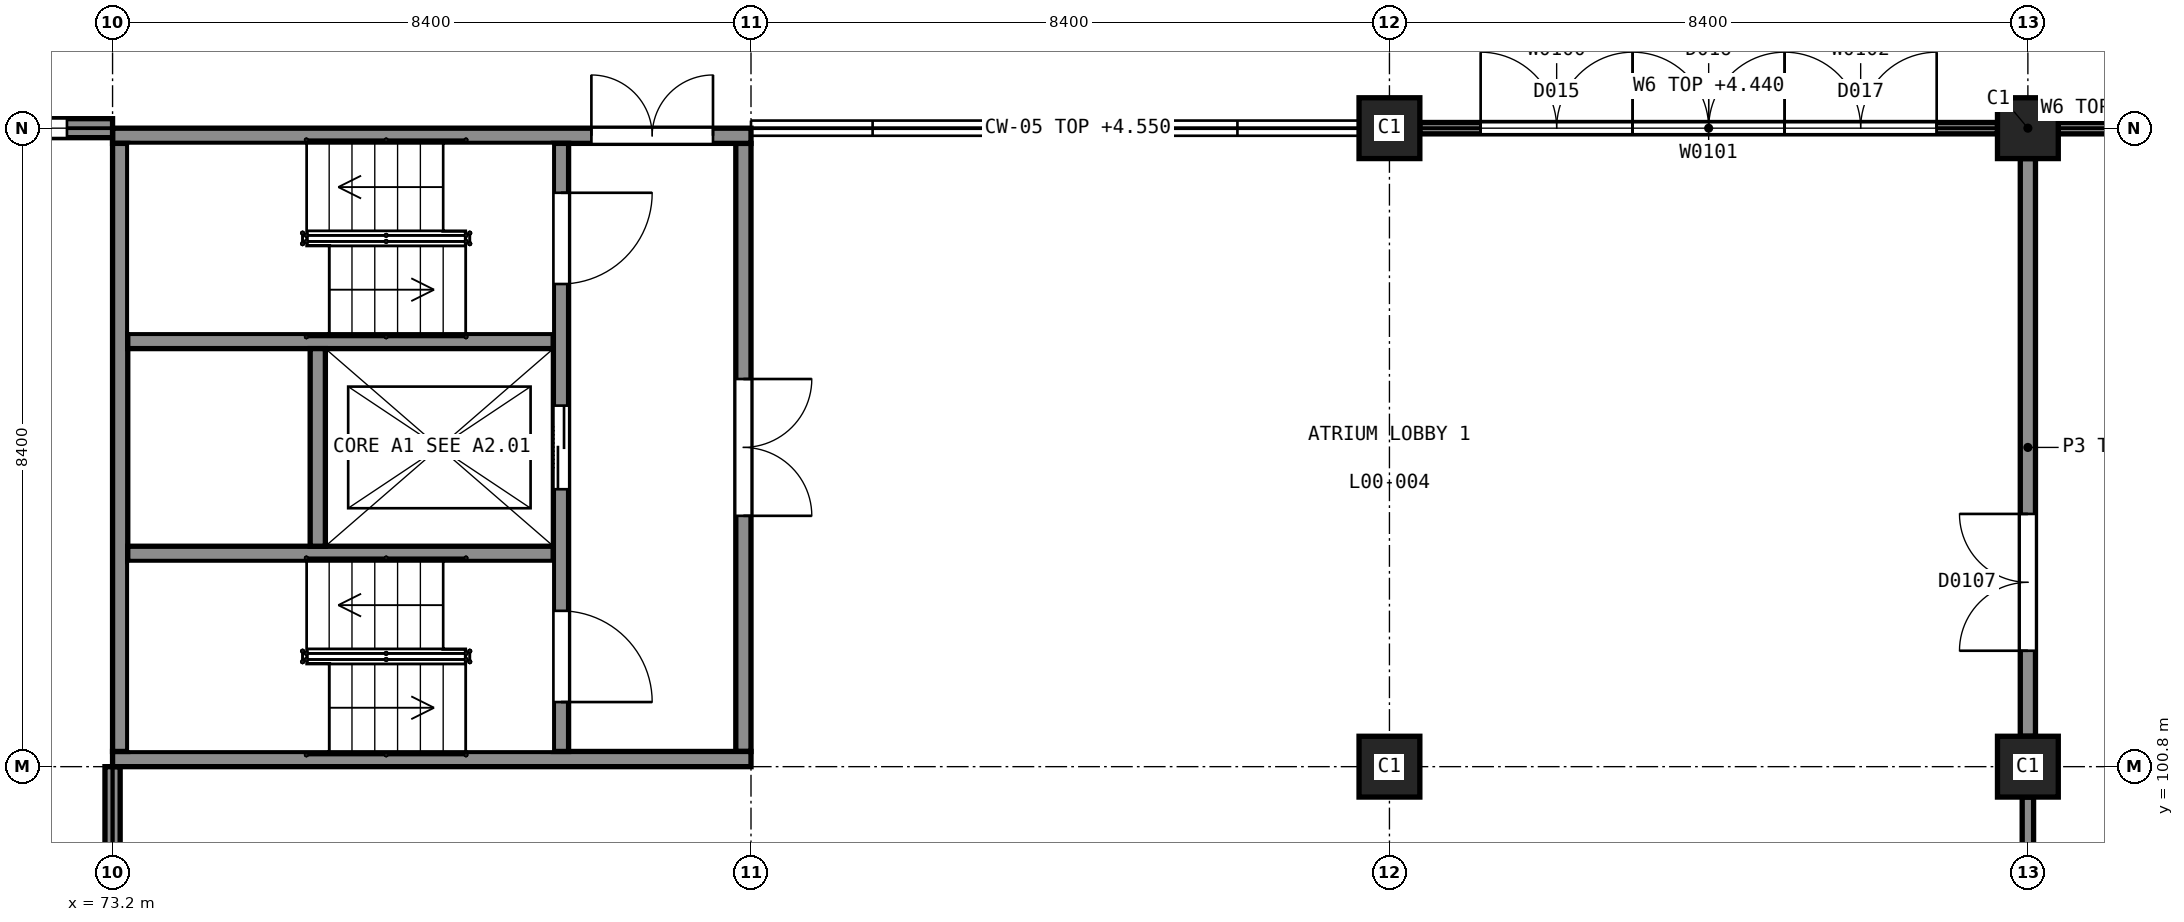
"""IFC4 building model, lengths in metres.
Left out: names, types, materials, properties, quantities, classifications, styles, units other than length and angle.
Written with IfcOpenShell. Run it as: python <this file> out.ifc"""

import sys

from ifc_helpers import new_model, si_unit, direction, frame, frame_2d, origin, origin_2d, place, context, subcontext, project, spatial, rectangle, extrude, element, fill, save


model = new_model("IFC4")
c1 = context("Model", 3, precision=1e-05, world=origin(), true_north=direction((0.0, 1.0)))
c2 = subcontext(c1, "Body", "Model", "MODEL_VIEW")
j1 = project(units=[si_unit("LENGTHUNIT", "METRE"), si_unit("PLANEANGLEUNIT", "RADIAN")], contexts=[c1])
p1 = place(None, origin())
s1 = spatial("IfcSite", under=j1, at=p1, CompositionType="ELEMENT")
p2 = place(p1, origin())
s2 = spatial("IfcBuilding", under=s1, at=p2, CompositionType="ELEMENT")
p3 = place(p2, origin())
s3 = spatial("IfcBuildingStorey", under=s2, at=p3, CompositionType="ELEMENT", Elevation=0.0)
p4 = place(p3, frame((73.2, 100.9, -1.8), z_axis=(0.0, 0.0, 1.0), x_axis=(1.0, 0.0, 0.0)))
e1 = element("IfcWall", 1, at=p4, inside=s3, PredefinedType="SHEAR", context=c2, shape_type="SweptSolid", body=[
    extrude(rectangle(XDim=8.4, YDim=0.2, at=frame_2d((4.2, 0.0))), origin(), (0.0, 0.0, 1.0), 7.3),
])
p5 = place(p3, frame((73.2, 109.1, -1.8), z_axis=(0.0, 0.0, 1.0), x_axis=(1.0, 0.0, 0.0)))
e2 = element("IfcWall", 2, at=p5, inside=s3, PredefinedType="SHEAR", context=c2, shape_type="SweptSolid", body=[
    extrude(rectangle(XDim=8.4, YDim=0.2, at=frame_2d((4.2, 0.0))), origin(), (0.0, 0.0, 1.0), 7.3),
])
p6 = place(p5, frame((6.3, 0.0, 1.8)))
e3 = element("IfcOpeningElement", 3, at=p6, cuts=e2, PredefinedType="OPENING", context=c2, shape_type="SweptSolid", body=[
    extrude(rectangle(XDim=1.6, YDim=2.1, at=frame_2d((0.8, 1.05))), frame((0.0, 0.11, 0.0), z_axis=(0.0, -1.0, 0.0), x_axis=(1.0, 0.0, 0.0)), (0.0, 0.0, 1.0), 0.22),
])
p7 = place(p3, frame((73.3, 101.0, -1.8), z_axis=(0.0, 0.0, 1.0), x_axis=(0.0, 1.0, 0.0)))
e4 = element("IfcWall", 4, at=p7, inside=s3, PredefinedType="SHEAR", context=c2, shape_type="SweptSolid", body=[
    extrude(rectangle(XDim=8.0, YDim=0.2, at=frame_2d((4.0, 0.0))), origin(), (0.0, 0.0, 1.0), 7.3),
])
p8 = place(p3, frame((81.5, 101.0, -1.8), z_axis=(0.0, 0.0, 1.0), x_axis=(0.0, 1.0, 0.0)))
e5 = element("IfcWall", 5, at=p8, inside=s3, PredefinedType="SHEAR", context=c2, shape_type="SweptSolid", body=[
    extrude(rectangle(XDim=8.0, YDim=0.2, at=frame_2d((4.0, 0.0))), origin(), (0.0, 0.0, 1.0), 7.3),
])
p9 = place(p8, frame((3.1, 0.0, 1.8)))
e6 = element("IfcOpeningElement", 6, at=p9, cuts=e5, PredefinedType="OPENING", context=c2, shape_type="SweptSolid", body=[
    extrude(rectangle(XDim=1.8, YDim=2.1, at=frame_2d((0.9, 1.05))), frame((0.0, 0.11, 0.0), z_axis=(0.0, -1.0, 0.0), x_axis=(1.0, 0.0, 0.0)), (0.0, 0.0, 1.0), 0.22),
])
p10 = place(p3, frame((79.1, 101.0, -1.8), z_axis=(0.0, 0.0, 1.0), x_axis=(0.0, 1.0, 0.0)))
e7 = element("IfcWall", 7, at=p10, inside=s3, PredefinedType="SHEAR", context=c2, shape_type="SweptSolid", body=[
    extrude(rectangle(XDim=8.0, YDim=0.2, at=frame_2d((4.0, 0.0))), origin(), (0.0, 0.0, 1.0), 7.3),
])
p11 = place(p10, frame((0.65, 0.0, 1.8)))
e8 = element("IfcOpeningElement", 8, at=p11, cuts=e7, PredefinedType="OPENING", context=c2, shape_type="SweptSolid", body=[
    extrude(rectangle(XDim=1.2, YDim=2.1, at=frame_2d((0.6, 1.05))), frame((0.0, 0.11, 0.0), z_axis=(0.0, -1.0, 0.0), x_axis=(1.0, 0.0, 0.0)), (0.0, 0.0, 1.0), 0.22),
])
p12 = place(p10, frame((6.15, 0.0, 1.8)))
e9 = element("IfcOpeningElement", 9, at=p12, cuts=e7, PredefinedType="OPENING", context=c2, shape_type="SweptSolid", body=[
    extrude(rectangle(XDim=1.2, YDim=2.1, at=frame_2d((0.6, 1.05))), frame((0.0, 0.11, 0.0), z_axis=(0.0, -1.0, 0.0), x_axis=(1.0, 0.0, 0.0)), (0.0, 0.0, 1.0), 0.22),
])
p13 = place(p10, frame((3.45, 0.0, 1.8)))
e10 = element("IfcOpeningElement", 10, at=p13, cuts=e7, PredefinedType="OPENING", context=c2, shape_type="SweptSolid", body=[
    extrude(rectangle(XDim=1.1, YDim=2.1, at=frame_2d((0.55, 1.05))), frame((0.0, 0.11, 0.0), z_axis=(0.0, -1.0, 0.0), x_axis=(1.0, 0.0, 0.0)), (0.0, 0.0, 1.0), 0.22),
])
for number, where, z_axis, x_axis in (
    (11, (73.4, 103.6, -1.8), (0.0, 0.0, 1.0), (1.0, 0.0, 0.0)),
    (12, (73.4, 106.4, -1.8), (0.0, 0.0, 1.0), (1.0, 0.0, 0.0)),
):
    element("IfcWall", number, at=place(p3, frame(where, z_axis=z_axis, x_axis=x_axis)), inside=s3, PredefinedType="SHEAR", context=c2, shape_type="SweptSolid", body=[
        extrude(rectangle(XDim=5.6, YDim=0.2, at=frame_2d((2.8, 0.0))), origin(), (0.0, 0.0, 1.0), 7.3),
    ])
p14 = place(p3, frame((75.9, 103.7, -1.8), z_axis=(0.0, 0.0, 1.0), x_axis=(0.0, 1.0, 0.0)))
e13 = element("IfcWall", 13, at=p14, inside=s3, PredefinedType="SHEAR", context=c2, shape_type="SweptSolid", body=[
    extrude(rectangle(XDim=2.6, YDim=0.2, at=frame_2d((1.3, 0.0))), origin(), (0.0, 0.0, 1.0), 7.3),
])
for number, where, z_axis, x_axis in (
    (14, (90.0, 100.8, -0.3), (0.0, 0.0, 1.0), (1.0, 0.0, 0.0)),
    (15, (90.0, 109.2, -0.3), (0.0, 0.0, 1.0), (1.0, 0.0, 0.0)),
    (16, (98.4, 100.8, -0.3), (0.0, 0.0, 1.0), (1.0, 0.0, 0.0)),
    (17, (98.4, 109.2, -0.3), (0.0, 0.0, 1.0), (1.0, 0.0, 0.0)),
):
    element("IfcColumn", number, at=place(p3, frame(where, z_axis=z_axis, x_axis=x_axis)), inside=s3, PredefinedType="COLUMN", context=c2, shape_type="SweptSolid", body=[
        extrude(rectangle(XDim=0.8, YDim=0.8, at=origin_2d()), origin(), (0.0, 0.0, 1.0), 5.8),
    ])
p15 = place(p3, frame((98.8, 109.2, 0.0), z_axis=(0.0, 0.0, 1.0), x_axis=(1.0, 0.0, 0.0)))
e18 = element("IfcWall", 18, at=p15, inside=s3, PredefinedType="ELEMENTEDWALL", context=c2, shape_type="SweptSolid", body=[
    extrude(rectangle(XDim=7.6, YDim=0.15, at=frame_2d((3.8, 0.0))), origin(), (0.0, 0.0, 1.0), 4.44),
])
p16 = place(p15, frame((2.0, 0.0, 0.0)))
e19 = element("IfcOpeningElement", 19, at=p16, cuts=e18, PredefinedType="OPENING", context=c2, shape_type="SweptSolid", body=[
    extrude(rectangle(XDim=1.8, YDim=2.4, at=frame_2d((0.9, 1.2))), frame((0.0, 0.085, 0.0), z_axis=(0.0, -1.0, 0.0), x_axis=(1.0, 0.0, 0.0)), (0.0, 0.0, 1.0), 0.17),
])
p17 = place(p15, frame((2.0, 0.0, 2.6)))
e20 = element("IfcOpeningElement", 20, at=p17, cuts=e18, PredefinedType="OPENING", context=c2, shape_type="SweptSolid", body=[
    extrude(rectangle(XDim=1.8, YDim=1.74, at=frame_2d((0.9, 0.87))), frame((0.0, 0.085, 0.0), z_axis=(0.0, -1.0, 0.0), x_axis=(1.0, 0.0, 0.0)), (0.0, 0.0, 1.0), 0.17),
])
p18 = place(p15, frame((3.8, 0.0, 0.0)))
e21 = element("IfcOpeningElement", 21, at=p18, cuts=e18, PredefinedType="OPENING", context=c2, shape_type="SweptSolid", body=[
    extrude(rectangle(XDim=1.8, YDim=2.4, at=frame_2d((0.9, 1.2))), frame((0.0, 0.085, 0.0), z_axis=(0.0, -1.0, 0.0), x_axis=(1.0, 0.0, 0.0)), (0.0, 0.0, 1.0), 0.17),
])
p19 = place(p15, frame((3.8, 0.0, 2.6)))
e22 = element("IfcOpeningElement", 22, at=p19, cuts=e18, PredefinedType="OPENING", context=c2, shape_type="SweptSolid", body=[
    extrude(rectangle(XDim=1.8, YDim=1.74, at=frame_2d((0.9, 0.87))), frame((0.0, 0.085, 0.0), z_axis=(0.0, -1.0, 0.0), x_axis=(1.0, 0.0, 0.0)), (0.0, 0.0, 1.0), 0.17),
])
p20 = place(p3, frame((90.4, 109.2, 0.0), z_axis=(0.0, 0.0, 1.0), x_axis=(1.0, 0.0, 0.0)))
e23 = element("IfcWall", 23, at=p20, inside=s3, PredefinedType="ELEMENTEDWALL", context=c2, shape_type="SweptSolid", body=[
    extrude(rectangle(XDim=7.6, YDim=0.15, at=frame_2d((3.8, 0.0))), origin(), (0.0, 0.0, 1.0), 4.44),
])
p21 = place(p20, frame((0.8, 0.0, 0.0)))
e24 = element("IfcOpeningElement", 24, at=p21, cuts=e23, PredefinedType="OPENING", context=c2, shape_type="SweptSolid", body=[
    extrude(rectangle(XDim=2.0, YDim=2.4, at=frame_2d((1.0, 1.2))), frame((0.0, 0.085, 0.0), z_axis=(0.0, -1.0, 0.0), x_axis=(1.0, 0.0, 0.0)), (0.0, 0.0, 1.0), 0.17),
])
p22 = place(p20, frame((0.8, 0.0, 2.6)))
e25 = element("IfcOpeningElement", 25, at=p22, cuts=e23, PredefinedType="OPENING", context=c2, shape_type="SweptSolid", body=[
    extrude(rectangle(XDim=2.0, YDim=1.74, at=frame_2d((1.0, 0.87))), frame((0.0, 0.085, 0.0), z_axis=(0.0, -1.0, 0.0), x_axis=(1.0, 0.0, 0.0)), (0.0, 0.0, 1.0), 0.17),
])
p23 = place(p20, frame((2.8, 0.0, 0.0)))
e26 = element("IfcOpeningElement", 26, at=p23, cuts=e23, PredefinedType="OPENING", context=c2, shape_type="SweptSolid", body=[
    extrude(rectangle(XDim=2.0, YDim=2.4, at=frame_2d((1.0, 1.2))), frame((0.0, 0.085, 0.0), z_axis=(0.0, -1.0, 0.0), x_axis=(1.0, 0.0, 0.0)), (0.0, 0.0, 1.0), 0.17),
])
p24 = place(p20, frame((2.8, 0.0, 2.6)))
e27 = element("IfcOpeningElement", 27, at=p24, cuts=e23, PredefinedType="OPENING", context=c2, shape_type="SweptSolid", body=[
    extrude(rectangle(XDim=2.0, YDim=1.74, at=frame_2d((1.0, 0.87))), frame((0.0, 0.085, 0.0), z_axis=(0.0, -1.0, 0.0), x_axis=(1.0, 0.0, 0.0)), (0.0, 0.0, 1.0), 0.17),
])
p25 = place(p20, frame((4.8, 0.0, 0.0)))
e28 = element("IfcOpeningElement", 28, at=p25, cuts=e23, PredefinedType="OPENING", context=c2, shape_type="SweptSolid", body=[
    extrude(rectangle(XDim=2.0, YDim=2.4, at=frame_2d((1.0, 1.2))), frame((0.0, 0.085, 0.0), z_axis=(0.0, -1.0, 0.0), x_axis=(1.0, 0.0, 0.0)), (0.0, 0.0, 1.0), 0.17),
])
p26 = place(p20, frame((4.8, 0.0, 2.6)))
e29 = element("IfcOpeningElement", 29, at=p26, cuts=e23, PredefinedType="OPENING", context=c2, shape_type="SweptSolid", body=[
    extrude(rectangle(XDim=2.0, YDim=1.74, at=frame_2d((1.0, 0.87))), frame((0.0, 0.085, 0.0), z_axis=(0.0, -1.0, 0.0), x_axis=(1.0, 0.0, 0.0)), (0.0, 0.0, 1.0), 0.17),
])
p27 = place(p3, frame((65.2, 109.2, 0.0), z_axis=(0.0, 0.0, 1.0), x_axis=(1.0, 0.0, 0.0)))
e30 = element("IfcWall", 30, at=p27, inside=s3, PredefinedType="SOLIDWALL", context=c2, shape_type="SweptSolid", body=[
    extrude(rectangle(XDim=8.0, YDim=0.25, at=frame_2d((4.0, 0.0))), origin(), (0.0, 0.0, 1.0), 4.44),
])
p28 = place(p27, frame((0.6, 0.0, 0.9)))
e31 = element("IfcOpeningElement", 31, at=p28, cuts=e30, PredefinedType="OPENING", context=c2, shape_type="SweptSolid", body=[
    extrude(rectangle(XDim=1.2, YDim=2.1, at=frame_2d((0.6, 1.05))), frame((0.0, 0.135, 0.0), z_axis=(0.0, -1.0, 0.0), x_axis=(1.0, 0.0, 0.0)), (0.0, 0.0, 1.0), 0.27),
])
p29 = place(p27, frame((3.4, 0.0, 0.9)))
e32 = element("IfcOpeningElement", 32, at=p29, cuts=e30, PredefinedType="OPENING", context=c2, shape_type="SweptSolid", body=[
    extrude(rectangle(XDim=1.2, YDim=2.1, at=frame_2d((0.6, 1.05))), frame((0.0, 0.135, 0.0), z_axis=(0.0, -1.0, 0.0), x_axis=(1.0, 0.0, 0.0)), (0.0, 0.0, 1.0), 0.27),
])
p30 = place(p27, frame((6.2, 0.0, 0.9)))
e33 = element("IfcOpeningElement", 33, at=p30, cuts=e30, PredefinedType="OPENING", context=c2, shape_type="SweptSolid", body=[
    extrude(rectangle(XDim=1.2, YDim=2.1, at=frame_2d((0.6, 1.05))), frame((0.0, 0.135, 0.0), z_axis=(0.0, -1.0, 0.0), x_axis=(1.0, 0.0, 0.0)), (0.0, 0.0, 1.0), 0.27),
])
p31 = place(p3, frame((98.4, 101.2, 0.0), z_axis=(0.0, 0.0, 1.0), x_axis=(0.0, 1.0, 0.0)))
e34 = element("IfcWall", 34, at=p31, inside=s3, PredefinedType="PARTITIONING", context=c2, shape_type="SweptSolid", body=[
    extrude(rectangle(XDim=7.6, YDim=0.2, at=frame_2d((3.8, 0.0))), origin(), (0.0, 0.0, 1.0), 4.4),
])
p32 = place(p31, frame((1.125, 0.0, 0.0)))
e35 = element("IfcOpeningElement", 35, at=p32, cuts=e34, PredefinedType="OPENING", context=c2, shape_type="SweptSolid", body=[
    extrude(rectangle(XDim=1.8, YDim=2.1, at=frame_2d((0.9, 1.05))), frame((0.0, 0.11, 0.0), z_axis=(0.0, -1.0, 0.0), x_axis=(1.0, 0.0, 0.0)), (0.0, 0.0, 1.0), 0.22),
])
p33 = place(p3, frame((98.4, 92.8, 0.0), z_axis=(0.0, 0.0, 1.0), x_axis=(0.0, 1.0, 0.0)))
e36 = element("IfcWall", 36, at=p33, inside=s3, PredefinedType="PARTITIONING", context=c2, shape_type="SweptSolid", body=[
    extrude(rectangle(XDim=7.6, YDim=0.15, at=frame_2d((3.8, 0.0))), origin(), (0.0, 0.0, 1.0), 4.4),
])
p34 = place(p3, frame((73.2, 92.4, 0.0), z_axis=(0.0, 0.0, 1.0), x_axis=(0.0, 1.0, 0.0)))
e37 = element("IfcWall", 37, at=p34, inside=s3, PredefinedType="PARTITIONING", context=c2, shape_type="SweptSolid", body=[
    extrude(rectangle(XDim=8.4, YDim=0.2, at=frame_2d((4.2, 0.0))), origin(), (0.0, 0.0, 1.0), 4.4),
])
p35 = place(p21, origin())
e38 = element("IfcDoor", 38, at=p35, inside=s3, OperationType="DOUBLE_DOOR_SINGLE_SWING", PredefinedType="DOOR", context=c2, shape_type="SweptSolid", body=[
    extrude(rectangle(XDim=2.0, YDim=2.4, at=frame_2d((1.0, 1.2))), frame((0.0, 0.025, 0.0), z_axis=(0.0, -1.0, 0.0), x_axis=(1.0, 0.0, 0.0)), (0.0, 0.0, 1.0), 0.05),
])
fill(e24, e38)
p36 = place(p22, origin())
e39 = element("IfcWindow", 39, at=p36, inside=s3, PartitioningType="SINGLE_PANEL", PredefinedType="WINDOW", context=c2, shape_type="SweptSolid", body=[
    extrude(rectangle(XDim=2.0, YDim=1.74, at=frame_2d((1.0, 0.87))), frame((0.0, 0.03, 0.0), z_axis=(0.0, -1.0, 0.0), x_axis=(1.0, 0.0, 0.0)), (0.0, 0.0, 1.0), 0.06),
])
fill(e25, e39)
p37 = place(p23, origin())
e40 = element("IfcDoor", 40, at=p37, inside=s3, OperationType="DOUBLE_DOOR_SINGLE_SWING", PredefinedType="DOOR", context=c2, shape_type="SweptSolid", body=[
    extrude(rectangle(XDim=2.0, YDim=2.4, at=frame_2d((1.0, 1.2))), frame((0.0, 0.025, 0.0), z_axis=(0.0, -1.0, 0.0), x_axis=(1.0, 0.0, 0.0)), (0.0, 0.0, 1.0), 0.05),
])
fill(e26, e40)
p38 = place(p24, origin())
e41 = element("IfcWindow", 41, at=p38, inside=s3, PartitioningType="SINGLE_PANEL", PredefinedType="WINDOW", context=c2, shape_type="SweptSolid", body=[
    extrude(rectangle(XDim=2.0, YDim=1.74, at=frame_2d((1.0, 0.87))), frame((0.0, 0.03, 0.0), z_axis=(0.0, -1.0, 0.0), x_axis=(1.0, 0.0, 0.0)), (0.0, 0.0, 1.0), 0.06),
])
fill(e27, e41)
p39 = place(p25, origin())
e42 = element("IfcDoor", 42, at=p39, inside=s3, OperationType="DOUBLE_DOOR_SINGLE_SWING", PredefinedType="DOOR", context=c2, shape_type="SweptSolid", body=[
    extrude(rectangle(XDim=2.0, YDim=2.4, at=frame_2d((1.0, 1.2))), frame((0.0, 0.025, 0.0), z_axis=(0.0, -1.0, 0.0), x_axis=(1.0, 0.0, 0.0)), (0.0, 0.0, 1.0), 0.05),
])
fill(e28, e42)
p40 = place(p26, origin())
e43 = element("IfcWindow", 43, at=p40, inside=s3, PartitioningType="SINGLE_PANEL", PredefinedType="WINDOW", context=c2, shape_type="SweptSolid", body=[
    extrude(rectangle(XDim=2.0, YDim=1.74, at=frame_2d((1.0, 0.87))), frame((0.0, 0.03, 0.0), z_axis=(0.0, -1.0, 0.0), x_axis=(1.0, 0.0, 0.0)), (0.0, 0.0, 1.0), 0.06),
])
fill(e29, e43)
p41 = place(p30, origin())
e44 = element("IfcWindow", 44, at=p41, inside=s3, PartitioningType="SINGLE_PANEL", PredefinedType="WINDOW", context=c2, shape_type="SweptSolid", body=[
    extrude(rectangle(XDim=1.2, YDim=2.1, at=frame_2d((0.6, 1.05))), frame((0.0, -0.045, 0.0), z_axis=(0.0, -1.0, 0.0), x_axis=(1.0, 0.0, 0.0)), (0.0, 0.0, 1.0), 0.06),
])
fill(e33, e44)
p42 = place(p6, origin())
e45 = element("IfcDoor", 45, at=p42, inside=s3, OperationType="DOUBLE_DOOR_SINGLE_SWING", PredefinedType="DOOR", context=c2, shape_type="SweptSolid", body=[
    extrude(rectangle(XDim=1.6, YDim=2.1, at=frame_2d((0.8, 1.05))), frame((0.0, 0.025, 0.0), z_axis=(0.0, -1.0, 0.0), x_axis=(1.0, 0.0, 0.0)), (0.0, 0.0, 1.0), 0.05),
])
fill(e3, e45)
p43 = place(p32, origin())
e46 = element("IfcDoor", 46, at=p43, inside=s3, OperationType="DOUBLE_DOOR_SINGLE_SWING", PredefinedType="DOOR", context=c2, shape_type="SweptSolid", body=[
    extrude(rectangle(XDim=1.8, YDim=2.1, at=frame_2d((0.9, 1.05))), frame((0.0, 0.025, 0.0), z_axis=(0.0, -1.0, 0.0), x_axis=(1.0, 0.0, 0.0)), (0.0, 0.0, 1.0), 0.05),
])
fill(e35, e46)
p44 = place(p9, origin())
e47 = element("IfcDoor", 47, at=p44, inside=s3, OperationType="DOUBLE_DOOR_SINGLE_SWING", PredefinedType="DOOR", context=c2, shape_type="SweptSolid", body=[
    extrude(rectangle(XDim=1.8, YDim=2.1, at=frame_2d((0.9, 1.05))), frame((0.0, 0.025, 0.0), z_axis=(0.0, -1.0, 0.0), x_axis=(1.0, 0.0, 0.0)), (0.0, 0.0, 1.0), 0.05),
])
fill(e6, e47)
p45 = place(p11, origin())
e48 = element("IfcDoor", 48, at=p45, inside=s3, OperationType="SINGLE_SWING_LEFT", PredefinedType="DOOR", context=c2, shape_type="SweptSolid", body=[
    extrude(rectangle(XDim=1.2, YDim=2.1, at=frame_2d((0.6, 1.05))), frame((0.0, 0.025, 0.0), z_axis=(0.0, -1.0, 0.0), x_axis=(1.0, 0.0, 0.0)), (0.0, 0.0, 1.0), 0.05),
])
fill(e8, e48)
p46 = place(p12, origin())
e49 = element("IfcDoor", 49, at=p46, inside=s3, OperationType="SINGLE_SWING_RIGHT", PredefinedType="DOOR", context=c2, shape_type="SweptSolid", body=[
    extrude(rectangle(XDim=1.2, YDim=2.1, at=frame_2d((0.6, 1.05))), frame((0.0, 0.025, 0.0), z_axis=(0.0, -1.0, 0.0), x_axis=(1.0, 0.0, 0.0)), (0.0, 0.0, 1.0), 0.05),
])
fill(e9, e49)
p47 = place(p13, origin())
e50 = element("IfcDoor", 50, at=p47, inside=s3, OperationType="DOUBLE_DOOR_SLIDING", PredefinedType="DOOR", context=c2, shape_type="SweptSolid", body=[
    extrude(rectangle(XDim=1.1, YDim=2.1, at=frame_2d((0.55, 1.05))), frame((0.0, 0.025, 0.0), z_axis=(0.0, -1.0, 0.0), x_axis=(1.0, 0.0, 0.0)), (0.0, 0.0, 1.0), 0.05),
])
fill(e10, e50)
save(model, sys.argv[1])
